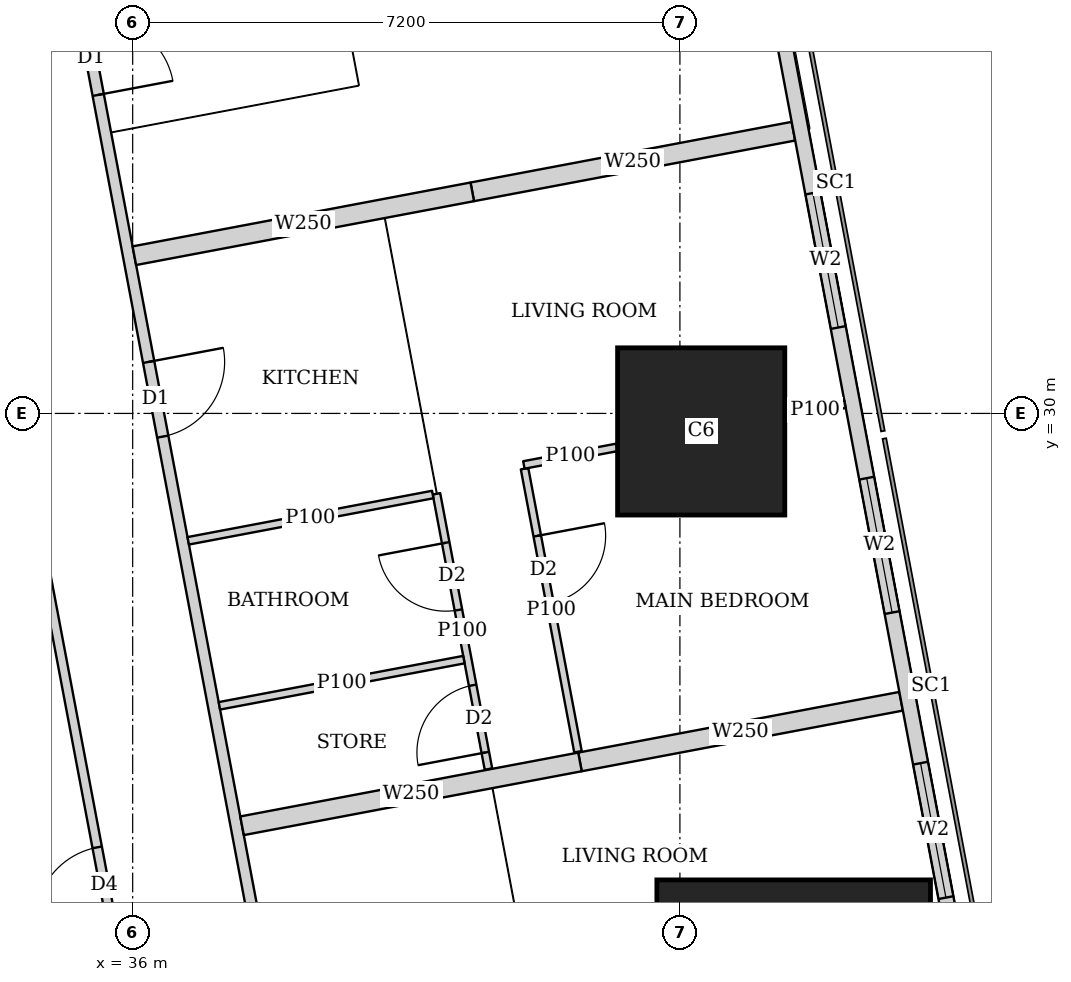
"""IFC4 building model, lengths in metres.
Left out: names, types, materials, properties, quantities, classifications, styles, units other than length and angle.
Written with IfcOpenShell. Run it as: python <this file> out.ifc"""

import sys

from ifc_helpers import new_model, si_unit, direction, frame, frame_2d, origin, origin_2d, place, context, subcontext, project, spatial, rectangle, extrude, element, fill, save


model = new_model("IFC4")
c1 = context("Model", 3, precision=1e-05, world=origin(), true_north=direction((0.0, 1.0)))
c2 = subcontext(c1, "Body", "Model", "MODEL_VIEW")
j1 = project(units=[si_unit("LENGTHUNIT", "METRE"), si_unit("PLANEANGLEUNIT", "RADIAN")], contexts=[c1])
p1 = place(None, origin())
s1 = spatial("IfcSite", under=j1, at=p1, CompositionType="ELEMENT")
p2 = place(p1, origin())
s2 = spatial("IfcBuilding", under=s1, at=p2, CompositionType="ELEMENT")
p3 = place(p2, frame((0.0, 0.0, 126.65)))
s3 = spatial("IfcBuildingStorey", under=s2, at=p3, CompositionType="ELEMENT", Elevation=126.65)
p4 = place(p3, frame((44.697, 22.263, 0.0), z_axis=(0.0, 0.0, 1.0), x_axis=(1.0, 0.0, 0.0)))
e1 = element("IfcColumn", 1, at=p4, inside=s3, PredefinedType="COLUMN", context=c2, shape_type="SweptSolid", body=[
    extrude(rectangle(XDim=3.6, YDim=3.2, at=origin_2d()), origin(), (0.0, 0.0, 1.0), 3.75),
])
p5 = place(p3, frame((43.48, 29.763, 0.0), z_axis=(0.0, 0.0, 1.0), x_axis=(1.0, 0.0, 0.0)))
e2 = element("IfcColumn", 2, at=p5, inside=s3, PredefinedType="COLUMN", context=c2, shape_type="SweptSolid", body=[
    extrude(rectangle(XDim=2.2, YDim=2.2, at=origin_2d()), origin(), (0.0, 0.0, 1.0), 3.75),
])
p6 = place(p3, frame((50.653, 2.703, 0.0), z_axis=(0.0, 0.0, 1.0), x_axis=(-0.185612026696, 0.982623109613, 0.0)))
e3 = element("IfcWall", 3, at=p6, inside=s3, PredefinedType="SOLIDWALL", context=c2, shape_type="SweptSolid", body=[
    extrude(rectangle(XDim=41.393, YDim=0.2, at=frame_2d((20.697, 0.0))), origin(), (0.0, 0.0, 1.0), 3.45),
])
p7 = place(p6, frame((1.633, 0.0, 0.9)))
e4 = element("IfcOpeningElement", 4, at=p7, cuts=e3, PredefinedType="OPENING", context=c2, shape_type="SweptSolid", body=[
    extrude(rectangle(XDim=1.8, YDim=1.5, at=frame_2d((0.9, 0.75))), frame((0.0, 0.11, 0.0), z_axis=(0.0, -1.0, 0.0), x_axis=(1.0, 0.0, 0.0)), (0.0, 0.0, 1.0), 0.22),
])
p8 = place(p6, frame((6.032, 0.0, 0.9)))
e5 = element("IfcOpeningElement", 5, at=p8, cuts=e3, PredefinedType="OPENING", context=c2, shape_type="SweptSolid", body=[
    extrude(rectangle(XDim=1.8, YDim=1.5, at=frame_2d((0.9, 0.75))), frame((0.0, 0.11, 0.0), z_axis=(0.0, -1.0, 0.0), x_axis=(1.0, 0.0, 0.0)), (0.0, 0.0, 1.0), 0.22),
])
p9 = place(p6, frame((9.848, 0.0, 0.9)))
e6 = element("IfcOpeningElement", 6, at=p9, cuts=e3, PredefinedType="OPENING", context=c2, shape_type="SweptSolid", body=[
    extrude(rectangle(XDim=1.8, YDim=1.5, at=frame_2d((0.9, 0.75))), frame((0.0, 0.11, 0.0), z_axis=(0.0, -1.0, 0.0), x_axis=(1.0, 0.0, 0.0)), (0.0, 0.0, 1.0), 0.22),
])
p10 = place(p6, frame((13.664, 0.0, 0.9)))
e7 = element("IfcOpeningElement", 7, at=p10, cuts=e3, PredefinedType="OPENING", context=c2, shape_type="SweptSolid", body=[
    extrude(rectangle(XDim=1.8, YDim=1.5, at=frame_2d((0.9, 0.75))), frame((0.0, 0.11, 0.0), z_axis=(0.0, -1.0, 0.0), x_axis=(1.0, 0.0, 0.0)), (0.0, 0.0, 1.0), 0.22),
])
p11 = place(p6, frame((17.481, 0.0, 0.9)))
e8 = element("IfcOpeningElement", 8, at=p11, cuts=e3, PredefinedType="OPENING", context=c2, shape_type="SweptSolid", body=[
    extrude(rectangle(XDim=1.8, YDim=1.5, at=frame_2d((0.9, 0.75))), frame((0.0, 0.11, 0.0), z_axis=(0.0, -1.0, 0.0), x_axis=(1.0, 0.0, 0.0)), (0.0, 0.0, 1.0), 0.22),
])
p12 = place(p6, frame((21.297, 0.0, 0.9)))
e9 = element("IfcOpeningElement", 9, at=p12, cuts=e3, PredefinedType="OPENING", context=c2, shape_type="SweptSolid", body=[
    extrude(rectangle(XDim=1.8, YDim=1.5, at=frame_2d((0.9, 0.75))), frame((0.0, 0.11, 0.0), z_axis=(0.0, -1.0, 0.0), x_axis=(1.0, 0.0, 0.0)), (0.0, 0.0, 1.0), 0.22),
])
p13 = place(p6, frame((25.113, 0.0, 0.9)))
e10 = element("IfcOpeningElement", 10, at=p13, cuts=e3, PredefinedType="OPENING", context=c2, shape_type="SweptSolid", body=[
    extrude(rectangle(XDim=1.8, YDim=1.5, at=frame_2d((0.9, 0.75))), frame((0.0, 0.11, 0.0), z_axis=(0.0, -1.0, 0.0), x_axis=(1.0, 0.0, 0.0)), (0.0, 0.0, 1.0), 0.22),
])
p14 = place(p6, frame((28.93, 0.0, 0.9)))
e11 = element("IfcOpeningElement", 11, at=p14, cuts=e3, PredefinedType="OPENING", context=c2, shape_type="SweptSolid", body=[
    extrude(rectangle(XDim=1.8, YDim=1.5, at=frame_2d((0.9, 0.75))), frame((0.0, 0.11, 0.0), z_axis=(0.0, -1.0, 0.0), x_axis=(1.0, 0.0, 0.0)), (0.0, 0.0, 1.0), 0.22),
])
p15 = place(p6, frame((32.746, 0.0, 0.9)))
e12 = element("IfcOpeningElement", 12, at=p15, cuts=e3, PredefinedType="OPENING", context=c2, shape_type="SweptSolid", body=[
    extrude(rectangle(XDim=1.8, YDim=1.5, at=frame_2d((0.9, 0.75))), frame((0.0, 0.11, 0.0), z_axis=(0.0, -1.0, 0.0), x_axis=(1.0, 0.0, 0.0)), (0.0, 0.0, 1.0), 0.22),
])
p16 = place(p6, frame((36.481, 0.0, 0.9)))
e13 = element("IfcOpeningElement", 13, at=p16, cuts=e3, PredefinedType="OPENING", context=c2, shape_type="SweptSolid", body=[
    extrude(rectangle(XDim=1.8, YDim=1.5, at=frame_2d((0.9, 0.75))), frame((0.0, 0.11, 0.0), z_axis=(0.0, -1.0, 0.0), x_axis=(1.0, 0.0, 0.0)), (0.0, 0.0, 1.0), 0.22),
])
p17 = place(p3, frame((33.896, 42.929, 0.0), z_axis=(0.0, 0.0, 1.0), x_axis=(0.1855961604, -0.982626106535, 0.0)))
e14 = element("IfcWall", 14, at=p17, inside=s3, PredefinedType="SOLIDWALL", context=c2, shape_type="SweptSolid", body=[
    extrude(rectangle(XDim=41.456, YDim=0.15, at=frame_2d((20.728, 0.0))), origin(), (0.0, 0.0, 1.0), 2.45),
])
p18 = place(p17, frame((7.893, 0.0, 0.0)))
e15 = element("IfcOpeningElement", 15, at=p18, cuts=e14, PredefinedType="OPENING", context=c2, shape_type="SweptSolid", body=[
    extrude(rectangle(XDim=1.0, YDim=2.1, at=frame_2d((0.5, 1.05))), frame((0.0, 0.085, 0.0), z_axis=(0.0, -1.0, 0.0), x_axis=(1.0, 0.0, 0.0)), (0.0, 0.0, 1.0), 0.17),
])
p19 = place(p17, frame((12.468, 0.0, 0.0)))
e16 = element("IfcOpeningElement", 16, at=p19, cuts=e14, PredefinedType="OPENING", context=c2, shape_type="SweptSolid", body=[
    extrude(rectangle(XDim=1.0, YDim=2.1, at=frame_2d((0.5, 1.05))), frame((0.0, 0.085, 0.0), z_axis=(0.0, -1.0, 0.0), x_axis=(1.0, 0.0, 0.0)), (0.0, 0.0, 1.0), 0.17),
])
p20 = place(p17, frame((20.101, 0.0, 0.0)))
e17 = element("IfcOpeningElement", 17, at=p20, cuts=e14, PredefinedType="OPENING", context=c2, shape_type="SweptSolid", body=[
    extrude(rectangle(XDim=1.0, YDim=2.1, at=frame_2d((0.5, 1.05))), frame((0.0, 0.085, 0.0), z_axis=(0.0, -1.0, 0.0), x_axis=(1.0, 0.0, 0.0)), (0.0, 0.0, 1.0), 0.17),
])
p21 = place(p17, frame((31.064, 0.0, 0.0)))
e18 = element("IfcOpeningElement", 18, at=p21, cuts=e14, PredefinedType="OPENING", context=c2, shape_type="SweptSolid", body=[
    extrude(rectangle(XDim=1.0, YDim=2.1, at=frame_2d((0.5, 1.05))), frame((0.0, 0.085, 0.0), z_axis=(0.0, -1.0, 0.0), x_axis=(1.0, 0.0, 0.0)), (0.0, 0.0, 1.0), 0.17),
])
p22 = place(p3, frame((41.156, 29.273, 0.0), z_axis=(0.0, 0.0, 1.0), x_axis=(0.185474762472, -0.982649028131, 0.0)))
e19 = element("IfcWall", 19, at=p22, inside=s3, PredefinedType="PARTITIONING", context=c2, shape_type="SweptSolid", body=[
    extrude(rectangle(XDim=3.79, YDim=0.1, at=frame_2d((1.895, 0.0))), origin(), (0.0, 0.0, 1.0), 2.45),
])
p23 = place(p22, frame((0.9, 0.0, 0.0)))
e20 = element("IfcOpeningElement", 20, at=p23, cuts=e19, PredefinedType="OPENING", context=c2, shape_type="SweptSolid", body=[
    extrude(rectangle(XDim=0.9, YDim=2.1, at=frame_2d((0.45, 1.05))), frame((0.0, 0.06, 0.0), z_axis=(0.0, -1.0, 0.0), x_axis=(1.0, 0.0, 0.0)), (0.0, 0.0, 1.0), 0.12),
])
p24 = place(p3, frame((39.997, 28.942, 0.0), z_axis=(0.0, 0.0, 1.0), x_axis=(0.185580474845, -0.982629069057, 0.0)))
e21 = element("IfcWall", 21, at=p24, inside=s3, PredefinedType="PARTITIONING", context=c2, shape_type="SweptSolid", body=[
    extrude(rectangle(XDim=3.685, YDim=0.1, at=frame_2d((1.842, 0.0))), origin(), (0.0, 0.0, 1.0), 3.45),
])
p25 = place(p24, frame((0.655, 0.0, 0.0)))
e22 = element("IfcOpeningElement", 22, at=p25, cuts=e21, PredefinedType="OPENING", context=c2, shape_type="SweptSolid", body=[
    extrude(rectangle(XDim=0.9, YDim=2.1, at=frame_2d((0.45, 1.05))), frame((0.0, 0.06, 0.0), z_axis=(0.0, -1.0, 0.0), x_axis=(1.0, 0.0, 0.0)), (0.0, 0.0, 1.0), 0.12),
])
p26 = place(p24, frame((2.563, 0.0, 0.0)))
e23 = element("IfcOpeningElement", 23, at=p26, cuts=e21, PredefinedType="OPENING", context=c2, shape_type="SweptSolid", body=[
    extrude(rectangle(XDim=0.9, YDim=2.1, at=frame_2d((0.45, 1.05))), frame((0.0, 0.06, 0.0), z_axis=(0.0, -1.0, 0.0), x_axis=(1.0, 0.0, 0.0)), (0.0, 0.0, 1.0), 0.12),
])
p27 = place(p3, frame((45.372, 30.121, 0.0), z_axis=(0.0, 0.0, 1.0), x_axis=(-0.982512656401, -0.186195810938, 0.0)))
e24 = element("IfcWall", 24, at=p27, inside=s3, PredefinedType="PARTITIONING", context=c2, shape_type="SweptSolid", body=[
    extrude(rectangle(XDim=0.796, YDim=0.1, at=frame_2d((0.398, 0.0))), origin(), (0.0, 0.0, 1.0), 3.45),
])
p28 = place(p3, frame((42.37, 29.553, 0.0), z_axis=(0.0, 0.0, 1.0), x_axis=(-0.98263602344, -0.185543648338, 0.0)))
e25 = element("IfcWall", 25, at=p28, inside=s3, PredefinedType="PARTITIONING", context=c2, shape_type="SweptSolid", body=[
    extrude(rectangle(XDim=1.245, YDim=0.1, at=frame_2d((0.623, 0.0))), origin(), (0.0, 0.0, 1.0), 2.45),
])
p29 = place(p3, frame((39.948, 28.933, 0.0), z_axis=(0.0, 0.0, 1.0), x_axis=(-0.982542259571, -0.186039533857, 0.0)))
e26 = element("IfcWall", 26, at=p29, inside=s3, PredefinedType="PARTITIONING", context=c2, shape_type="SweptSolid", body=[
    extrude(rectangle(XDim=3.274, YDim=0.1, at=frame_2d((1.637, 0.0))), origin(), (0.0, 0.0, 1.0), 3.45),
])
p30 = place(p3, frame((40.358, 26.761, 0.0), z_axis=(0.0, 0.0, 1.0), x_axis=(-0.982607776398, -0.185693181787, 0.0)))
e27 = element("IfcWall", 27, at=p30, inside=s3, PredefinedType="PARTITIONING", context=c2, shape_type="SweptSolid", body=[
    extrude(rectangle(XDim=3.274, YDim=0.1, at=frame_2d((1.637, 0.0))), origin(), (0.0, 0.0, 1.0), 3.45),
])
p31 = place(p3, frame((44.693, 33.713, 0.0), z_axis=(0.0, 0.0, 1.0), x_axis=(-0.982633535512, -0.185556823879, 0.0)))
e28 = element("IfcWall", 28, at=p31, inside=s3, PredefinedType="SOLIDWALL", context=c2, shape_type="SweptSolid", body=[
    extrude(rectangle(XDim=4.3, YDim=0.25, at=frame_2d((2.15, 0.0))), origin(), (0.0, 0.0, 1.0), 2.15),
])
p32 = place(p3, frame((40.468, 32.915, 0.0), z_axis=(0.0, 0.0, 1.0), x_axis=(-0.982612837616, -0.185666398014, 0.0)))
e29 = element("IfcWall", 29, at=p32, inside=s3, PredefinedType="SOLIDWALL", context=c2, shape_type="SweptSolid", body=[
    extrude(rectangle(XDim=4.525, YDim=0.25, at=frame_2d((2.262, 0.0))), origin(), (0.0, 0.0, 1.0), 3.45),
])
p33 = place(p3, frame((46.11, 26.213, 0.0), z_axis=(0.0, 0.0, 1.0), x_axis=(-0.982633535512, -0.185556823879, 0.0)))
e30 = element("IfcWall", 30, at=p33, inside=s3, PredefinedType="SOLIDWALL", context=c2, shape_type="SweptSolid", body=[
    extrude(rectangle(XDim=4.3, YDim=0.25, at=frame_2d((2.15, 0.0))), origin(), (0.0, 0.0, 1.0), 2.15),
])
p34 = place(p3, frame((41.885, 25.415, 0.0), z_axis=(0.0, 0.0, 1.0), x_axis=(-0.982612837616, -0.185666398014, 0.0)))
e31 = element("IfcWall", 31, at=p34, inside=s3, PredefinedType="SOLIDWALL", context=c2, shape_type="SweptSolid", body=[
    extrude(rectangle(XDim=4.525, YDim=0.25, at=frame_2d((2.262, 0.0))), origin(), (0.0, 0.0, 1.0), 3.45),
])
p35 = place(p3, frame((38.202, 10.163, 0.0), z_axis=(0.0, 0.0, 1.0), x_axis=(-0.185610321132, 0.982623431783, 0.0)))
e32 = element("IfcWall", 32, at=p35, inside=s3, PredefinedType="PARTITIONING", context=c2, shape_type="SweptSolid", body=[
    extrude(rectangle(XDim=25.111, YDim=0.125, at=frame_2d((12.556, 0.0))), origin(), (0.0, 0.0, 1.0), 2.45),
])
p36 = place(p35, frame((0.708, 0.0, 0.0)))
e33 = element("IfcOpeningElement", 33, at=p36, cuts=e32, PredefinedType="OPENING", context=c2, shape_type="SweptSolid", body=[
    extrude(rectangle(XDim=1.0, YDim=2.1, at=frame_2d((0.5, 1.05))), frame((0.0, 0.073, 0.0), z_axis=(0.0, -1.0, 0.0), x_axis=(1.0, 0.0, 0.0)), (0.0, 0.0, 1.0), 0.145),
])
p37 = place(p35, frame((13.378, 0.0, 0.0)))
e34 = element("IfcOpeningElement", 34, at=p37, cuts=e32, PredefinedType="OPENING", context=c2, shape_type="SweptSolid", body=[
    extrude(rectangle(XDim=1.0, YDim=2.1, at=frame_2d((0.5, 1.05))), frame((0.0, 0.073, 0.0), z_axis=(0.0, -1.0, 0.0), x_axis=(1.0, 0.0, 0.0)), (0.0, 0.0, 1.0), 0.145),
])
p38 = place(p35, frame((21.25, 0.0, 0.0)))
e35 = element("IfcOpeningElement", 35, at=p38, cuts=e32, PredefinedType="OPENING", context=c2, shape_type="SweptSolid", body=[
    extrude(rectangle(XDim=1.0, YDim=2.1, at=frame_2d((0.5, 1.05))), frame((0.0, 0.073, 0.0), z_axis=(0.0, -1.0, 0.0), x_axis=(1.0, 0.0, 0.0)), (0.0, 0.0, 1.0), 0.145),
])
p39 = place(p35, frame((23.453, 0.0, 0.0)))
e36 = element("IfcOpeningElement", 36, at=p39, cuts=e32, PredefinedType="OPENING", context=c2, shape_type="SweptSolid", body=[
    extrude(rectangle(XDim=1.0, YDim=2.1, at=frame_2d((0.5, 1.05))), frame((0.0, 0.073, 0.0), z_axis=(0.0, -1.0, 0.0), x_axis=(1.0, 0.0, 0.0)), (0.0, 0.0, 1.0), 0.145),
])
p40 = place(p12, origin())
e37 = element("IfcWindow", 37, at=p40, inside=s3, PartitioningType="SINGLE_PANEL", PredefinedType="WINDOW", context=c2, shape_type="SweptSolid", body=[
    extrude(rectangle(XDim=1.8, YDim=1.5, at=frame_2d((0.9, 0.75))), frame((0.0, 0.03, 0.0), z_axis=(0.0, -1.0, 0.0), x_axis=(1.0, 0.0, 0.0)), (0.0, 0.0, 1.0), 0.06),
])
fill(e9, e37)
p41 = place(p13, origin())
e38 = element("IfcWindow", 38, at=p41, inside=s3, PartitioningType="SINGLE_PANEL", PredefinedType="WINDOW", context=c2, shape_type="SweptSolid", body=[
    extrude(rectangle(XDim=1.8, YDim=1.5, at=frame_2d((0.9, 0.75))), frame((0.0, 0.03, 0.0), z_axis=(0.0, -1.0, 0.0), x_axis=(1.0, 0.0, 0.0)), (0.0, 0.0, 1.0), 0.06),
])
fill(e10, e38)
p42 = place(p14, origin())
e39 = element("IfcWindow", 39, at=p42, inside=s3, PartitioningType="SINGLE_PANEL", PredefinedType="WINDOW", context=c2, shape_type="SweptSolid", body=[
    extrude(rectangle(XDim=1.8, YDim=1.5, at=frame_2d((0.9, 0.75))), frame((0.0, 0.03, 0.0), z_axis=(0.0, -1.0, 0.0), x_axis=(1.0, 0.0, 0.0)), (0.0, 0.0, 1.0), 0.06),
])
fill(e11, e39)
p43 = place(p18, origin())
e40 = element("IfcDoor", 40, at=p43, inside=s3, OperationType="SINGLE_SWING_RIGHT", PredefinedType="DOOR", context=c2, shape_type="SweptSolid", body=[
    extrude(rectangle(XDim=1.0, YDim=2.1, at=frame_2d((0.5, 1.05))), frame((0.0, 0.025, 0.0), z_axis=(0.0, -1.0, 0.0), x_axis=(1.0, 0.0, 0.0)), (0.0, 0.0, 1.0), 0.05),
])
fill(e15, e40)
p44 = place(p23, origin())
e41 = element("IfcDoor", 41, at=p44, inside=s3, OperationType="SINGLE_SWING_LEFT", PredefinedType="DOOR", context=c2, shape_type="SweptSolid", body=[
    extrude(rectangle(XDim=0.9, YDim=2.1, at=frame_2d((0.45, 1.05))), frame((0.0, 0.025, 0.0), z_axis=(0.0, -1.0, 0.0), x_axis=(1.0, 0.0, 0.0)), (0.0, 0.0, 1.0), 0.05),
])
fill(e20, e41)
p45 = place(p25, origin())
e42 = element("IfcDoor", 42, at=p45, inside=s3, OperationType="SINGLE_SWING_RIGHT", PredefinedType="DOOR", context=c2, shape_type="SweptSolid", body=[
    extrude(rectangle(XDim=0.9, YDim=2.1, at=frame_2d((0.45, 1.05))), frame((0.0, 0.025, 0.0), z_axis=(0.0, -1.0, 0.0), x_axis=(1.0, 0.0, 0.0)), (0.0, 0.0, 1.0), 0.05),
])
fill(e22, e42)
p46 = place(p26, origin())
e43 = element("IfcDoor", 43, at=p46, inside=s3, OperationType="SINGLE_SWING_LEFT", PredefinedType="DOOR", context=c2, shape_type="SweptSolid", body=[
    extrude(rectangle(XDim=0.9, YDim=2.1, at=frame_2d((0.45, 1.05))), frame((0.0, 0.025, 0.0), z_axis=(0.0, -1.0, 0.0), x_axis=(1.0, 0.0, 0.0)), (0.0, 0.0, 1.0), 0.05),
])
fill(e23, e43)
p47 = place(p19, origin())
e44 = element("IfcDoor", 44, at=p47, inside=s3, OperationType="SINGLE_SWING_LEFT", PredefinedType="DOOR", context=c2, shape_type="SweptSolid", body=[
    extrude(rectangle(XDim=1.0, YDim=2.1, at=frame_2d((0.5, 1.05))), frame((0.0, 0.025, 0.0), z_axis=(0.0, -1.0, 0.0), x_axis=(1.0, 0.0, 0.0)), (0.0, 0.0, 1.0), 0.05),
])
fill(e16, e44)
p48 = place(p37, origin())
e45 = element("IfcDoor", 45, at=p48, inside=s3, OperationType="SINGLE_SWING_LEFT", PredefinedType="DOOR", context=c2, shape_type="SweptSolid", body=[
    extrude(rectangle(XDim=1.0, YDim=2.1, at=frame_2d((0.5, 1.05))), frame((0.0, 0.025, 0.0), z_axis=(0.0, -1.0, 0.0), x_axis=(1.0, 0.0, 0.0)), (0.0, 0.0, 1.0), 0.05),
])
fill(e34, e45)
save(model, sys.argv[1])
